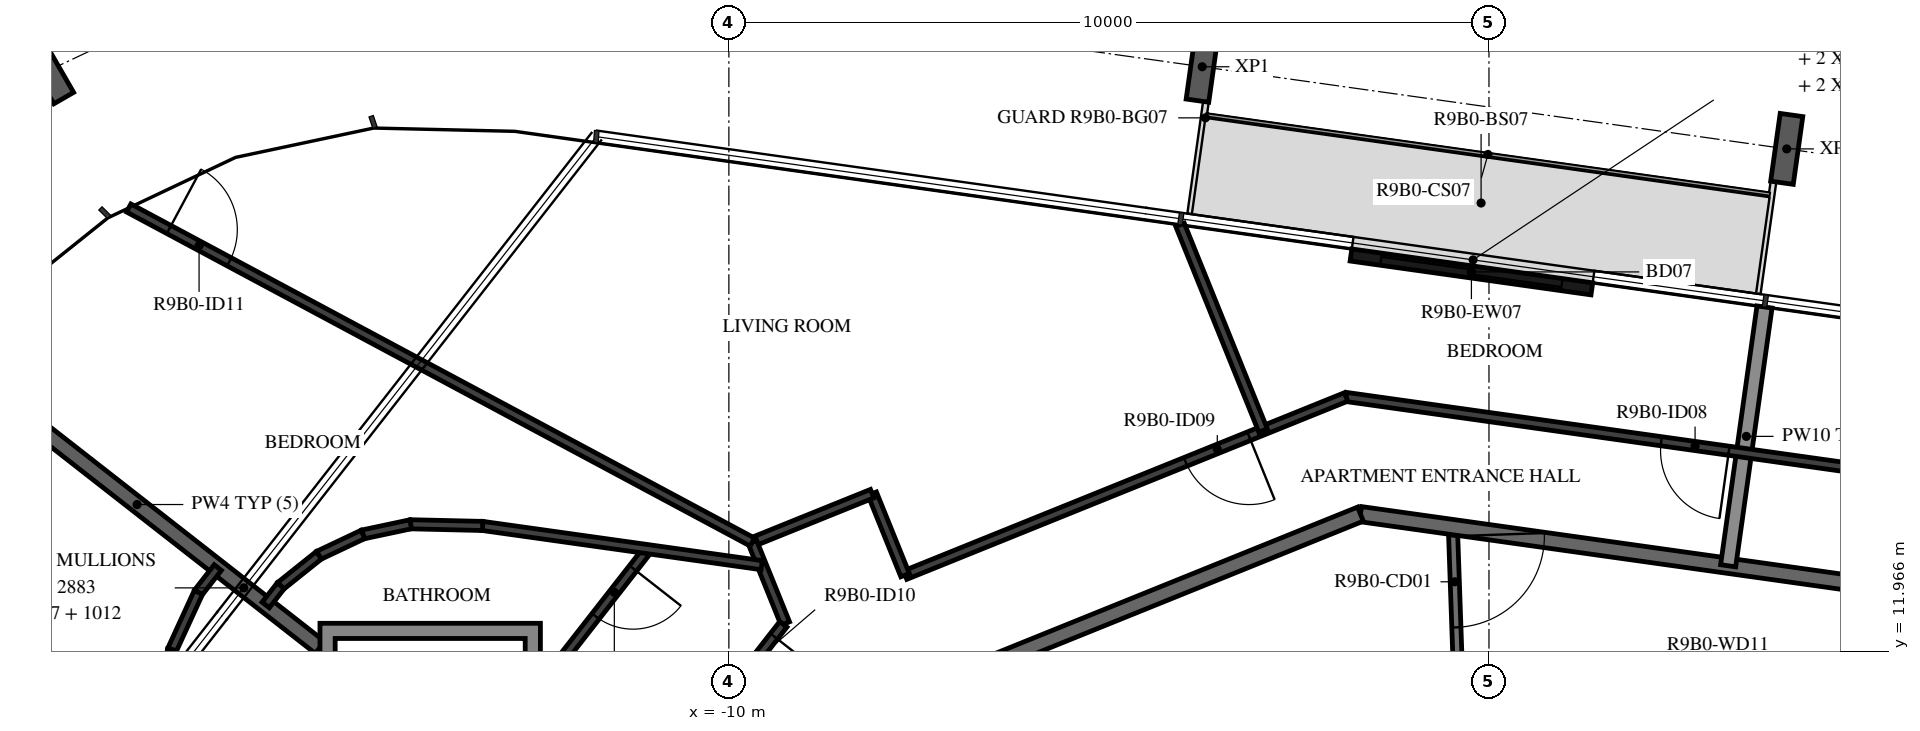
"""IFC4 building model, lengths in metres.
Left out: names, types, materials, properties, quantities, classifications, styles, units other than length and angle.
Written with IfcOpenShell. Run it as: python <this file> out.ifc"""

import sys

from ifc_helpers import new_model, si_unit, direction, frame, frame_2d, origin, origin_2d, place, context, subcontext, project, spatial, polyline, rectangle, i_section, outline, extrude, element, fill, save


model = new_model("IFC4")
c1 = context("Model", 3, precision=1e-05, world=origin(), true_north=direction((0.0, 1.0)))
c2 = subcontext(c1, "Body", "Model", "MODEL_VIEW")
j1 = project(units=[si_unit("LENGTHUNIT", "METRE"), si_unit("PLANEANGLEUNIT", "RADIAN")], contexts=[c1])
p1 = place(None, origin())
s1 = spatial("IfcSite", under=j1, at=p1, CompositionType="ELEMENT")
p2 = place(p1, origin())
s2 = spatial("IfcBuilding", under=s1, at=p2, CompositionType="ELEMENT")
p3 = place(p2, frame((0.0, 0.0, 347.0)))
s3 = spatial("IfcBuildingStorey", under=s2, at=p3, CompositionType="ELEMENT", Elevation=347.0)
for number, where, z_axis, x_axis in (
    (1, (3.917, 18.574, -0.38), (0.0, 0.0, 1.0), (0.99, -0.139, 0.0)),
    (2, (-3.773, 19.655, -0.38), (0.0, 0.0, 1.0), (0.99, -0.139, 0.0)),
    (3, (-18.976, 19.632, -0.38), (0.0, 0.0, 1.0), (0.866, 0.5, 0.0)),
):
    element("IfcColumn", number, at=place(p3, frame(where, z_axis=z_axis, x_axis=x_axis)), inside=s3, PredefinedType="COLUMN", context=c2, shape_type="SweptSolid", body=[
        extrude(i_section(OverallWidth=0.3, OverallDepth=0.9, WebThickness=0.019, FlangeThickness=0.035, FilletRadius=0.03, at=origin_2d()), origin(), (0.0, 0.0, 1.0), 3.5),
    ])
p4 = place(p3, frame((1.354, 16.733, 0.0), z_axis=(0.0, 0.0, 1.0), x_axis=(-0.990270382149, 0.139156639217, 0.0)))
e4 = element("IfcWall", 4, at=p4, inside=s3, PredefinedType="STANDARD", context=c2, shape_type="SweptSolid", body=[
    extrude(rectangle(XDim=3.2, YDim=0.16, at=frame_2d((1.6, 0.0))), origin(), (0.0, 0.0, 1.0), 3.12),
])
p5 = place(p4, frame((0.4, 0.0, 0.0)))
e5 = element("IfcOpeningElement", 5, at=p5, cuts=e4, PredefinedType="OPENING", context=c2, shape_type="SweptSolid", body=[
    extrude(rectangle(XDim=2.4, YDim=2.4, at=frame_2d((1.2, 1.2))), frame((0.0, 0.09, 0.0), z_axis=(0.0, -1.0, 0.0), x_axis=(1.0, 0.0, 0.0)), (0.0, 0.0, 1.0), 0.18),
])
p6 = place(p3, frame((-0.475, 13.598, 0.0), z_axis=(0.0, 0.0, 1.0), x_axis=(0.034852521429, -0.999392466326, 0.0)))
e6 = element("IfcWall", 6, at=p6, inside=s3, PredefinedType="PARTITIONING", context=c2, shape_type="SweptSolid", body=[
    extrude(rectangle(XDim=1.702, YDim=0.12, at=frame_2d((0.851, 0.0))), origin(), (0.0, 0.0, 1.0), 3.12),
])
p7 = place(p6, frame((0.12, 0.0, 0.0)))
e7 = element("IfcOpeningElement", 7, at=p7, cuts=e6, PredefinedType="OPENING", context=c2, shape_type="SweptSolid", body=[
    extrude(rectangle(XDim=1.2, YDim=2.1, at=frame_2d((0.6, 1.05))), frame((0.0, 0.07, 0.0), z_axis=(0.0, -1.0, 0.0), x_axis=(1.0, 0.0, 0.0)), (0.0, 0.0, 1.0), 0.14),
])
p8 = place(p3, frame((5.42, 12.77, 0.0), z_axis=(0.0, 0.0, 1.0), x_axis=(-0.990270565508, 0.139155334385, 0.0)))
e8 = element("IfcWall", 8, at=p8, inside=s3, PredefinedType="STANDARD", context=c2, shape_type="SweptSolid", body=[
    extrude(rectangle(XDim=7.181, YDim=0.2, at=frame_2d((3.59, 0.0))), origin(), (0.0, 0.0, 1.0), 3.12),
])
p9 = place(p3, frame((-1.691, 13.769, 0.0), z_axis=(0.0, 0.0, 1.0), x_axis=(-0.92717916932, -0.374618189599, 0.0)))
e9 = element("IfcWall", 9, at=p9, inside=s3, PredefinedType="STANDARD", context=c2, shape_type="SweptSolid", body=[
    extrude(rectangle(XDim=7.181, YDim=0.2, at=frame_2d((3.591, 0.0))), origin(), (0.0, 0.0, 1.0), 3.12),
])
p10 = place(p3, frame((3.625, 16.494, 0.0), z_axis=(0.0, 0.0, 1.0), x_axis=(-0.139174320859, -0.990267897295, 0.0)))
e10 = element("IfcWall", 10, at=p10, inside=s3, PredefinedType="STANDARD", context=c2, shape_type="SweptSolid", body=[
    extrude(rectangle(XDim=3.438, YDim=0.2, at=frame_2d((1.719, 0.0))), origin(), (0.0, 0.0, 1.0), 2.73),
])
p11 = place(p3, frame((-20.191, 15.775, 0.0), z_axis=(0.0, 0.0, 1.0), x_axis=(0.788021948923, -0.615647145706, 0.0)))
e11 = element("IfcWall", 11, at=p11, inside=s3, PredefinedType="STANDARD", context=c2, shape_type="SweptSolid", body=[
    extrude(rectangle(XDim=6.106, YDim=0.2, at=frame_2d((3.053, 0.0))), origin(), (0.0, 0.0, 1.0), 3.12),
])
p12 = place(p3, frame((6.027, 14.199, 0.0), z_axis=(0.0, 0.0, 1.0), x_axis=(-0.990271593532, 0.139148018469, 0.0)))
e12 = element("IfcWall", 12, at=p12, inside=s3, PredefinedType="PARTITIONING", context=c2, shape_type="SweptSolid", body=[
    extrude(rectangle(XDim=7.985, YDim=0.12, at=frame_2d((3.992, 0.0))), origin(), (0.0, 0.0, 1.0), 3.12),
])
p13 = place(p12, frame((2.898, 0.0, 0.0)))
e13 = element("IfcOpeningElement", 13, at=p13, cuts=e12, PredefinedType="OPENING", context=c2, shape_type="SweptSolid", body=[
    extrude(rectangle(XDim=0.9, YDim=2.1, at=frame_2d((0.45, 1.05))), frame((0.0, 0.07, 0.0), z_axis=(0.0, -1.0, 0.0), x_axis=(1.0, 0.0, 0.0)), (0.0, 0.0, 1.0), 0.14),
])
p14 = place(p3, frame((-1.88, 15.311, 0.0), z_axis=(0.0, 0.0, 1.0), x_axis=(-0.927182163322, -0.374610779365, 0.0)))
e14 = element("IfcWall", 14, at=p14, inside=s3, PredefinedType="PARTITIONING", context=c2, shape_type="SweptSolid", body=[
    extrude(rectangle(XDim=6.257, YDim=0.12, at=frame_2d((3.128, 0.0))), origin(), (0.0, 0.0, 1.0), 3.12),
])
p15 = place(p14, frame((1.377, 0.0, 0.0)))
e15 = element("IfcOpeningElement", 15, at=p15, cuts=e14, PredefinedType="OPENING", context=c2, shape_type="SweptSolid", body=[
    extrude(rectangle(XDim=0.9, YDim=2.1, at=frame_2d((0.45, 1.05))), frame((0.0, 0.07, 0.0), z_axis=(0.0, -1.0, 0.0), x_axis=(1.0, 0.0, 0.0)), (0.0, 0.0, 1.0), 0.14),
])
p16 = place(p3, frame((-7.681, 12.967, 0.0), z_axis=(0.0, 0.0, 1.0), x_axis=(-0.374592224266, 0.927189659951, 0.0)))
e16 = element("IfcWall", 16, at=p16, inside=s3, PredefinedType="PARTITIONING", context=c2, shape_type="SweptSolid", body=[
    extrude(rectangle(XDim=1.156, YDim=0.12, at=frame_2d((0.578, 0.0))), origin(), (0.0, 0.0, 1.0), 3.12),
])
p17 = place(p3, frame((-8.115, 14.039, 0.0), z_axis=(0.0, 0.0, 1.0), x_axis=(-0.927153589835, -0.374681492546, 0.0)))
e17 = element("IfcWall", 17, at=p17, inside=s3, PredefinedType="PARTITIONING", context=c2, shape_type="SweptSolid", body=[
    extrude(rectangle(XDim=1.7, YDim=0.12, at=frame_2d((0.85, 0.0))), origin(), (0.0, 0.0, 1.0), 3.12),
])
p18 = place(p3, frame((-9.691, 13.402, 0.0), z_axis=(0.0, 0.0, 1.0), x_axis=(0.374484003097, -0.927233374844, 0.0)))
e18 = element("IfcWall", 18, at=p18, inside=s3, PredefinedType="PARTITIONING", context=c2, shape_type="SweptSolid", body=[
    extrude(rectangle(XDim=1.156, YDim=0.12, at=frame_2d((0.578, 0.0))), origin(), (0.0, 0.0, 1.0), 3.12),
])
p19 = place(p3, frame((-9.283, 12.319, 0.0), z_axis=(0.0, 0.0, 1.0), x_axis=(-0.61567489546, -0.788000268464, 0.0)))
e19 = element("IfcWall", 19, at=p19, inside=s3, PredefinedType="PARTITIONING", context=c2, shape_type="SweptSolid", body=[
    extrude(rectangle(XDim=7.985, YDim=0.12, at=frame_2d((3.992, 0.0))), origin(), (0.0, 0.0, 1.0), 3.12),
])
p20 = place(p19, frame((0.2, 0.0, 0.0)))
e20 = element("IfcOpeningElement", 20, at=p20, cuts=e19, PredefinedType="OPENING", context=c2, shape_type="SweptSolid", body=[
    extrude(rectangle(XDim=0.9, YDim=2.1, at=frame_2d((0.45, 1.05))), frame((0.0, 0.07, 0.0), z_axis=(0.0, -1.0, 0.0), x_axis=(1.0, 0.0, 0.0)), (0.0, 0.0, 1.0), 0.14),
])
p21 = place(p19, frame((4.592, 0.0, 0.0)))
e21 = element("IfcOpeningElement", 21, at=p21, cuts=e19, PredefinedType="OPENING", context=c2, shape_type="SweptSolid", body=[
    extrude(rectangle(XDim=0.9, YDim=2.1, at=frame_2d((0.45, 1.05))), frame((0.0, 0.07, 0.0), z_axis=(0.0, -1.0, 0.0), x_axis=(1.0, 0.0, 0.0)), (0.0, 0.0, 1.0), 0.14),
])
p22 = place(p3, frame((-4.065, 17.575, 0.0), z_axis=(0.0, 0.0, 1.0), x_axis=(0.374619347258, -0.927178701578, 0.0)))
e22 = element("IfcWall", 22, at=p22, inside=s3, PredefinedType="PARTITIONING", context=c2, shape_type="SweptSolid", body=[
    extrude(rectangle(XDim=2.918, YDim=0.12, at=frame_2d((1.459, 0.0))), origin(), (0.0, 0.0, 1.0), 3.12),
])
p23 = place(p3, frame((-17.896, 17.797, 0.0), z_axis=(0.0, 0.0, 1.0), x_axis=(0.88150492406, -0.4721748287, 0.0)))
e23 = element("IfcWall", 23, at=p23, inside=s3, PredefinedType="PARTITIONING", context=c2, shape_type="SweptSolid", body=[
    extrude(rectangle(XDim=9.308, YDim=0.12, at=frame_2d((4.654, 0.0))), origin(), (0.0, 0.0, 1.0), 3.12),
])
p24 = place(p23, frame((0.6, 0.0, 0.0)))
e24 = element("IfcOpeningElement", 24, at=p24, cuts=e23, PredefinedType="OPENING", context=c2, shape_type="SweptSolid", body=[
    extrude(rectangle(XDim=0.9, YDim=2.1, at=frame_2d((0.45, 1.05))), frame((0.0, 0.07, 0.0), z_axis=(0.0, -1.0, 0.0), x_axis=(1.0, 0.0, 0.0)), (0.0, 0.0, 1.0), 0.14),
])
p25 = place(p3, frame((-11.064, 13.308, 0.0), z_axis=(0.0, 0.0, 1.0), x_axis=(-0.615681126827, -0.787995399777, 0.0)))
e25 = element("IfcWall", 25, at=p25, inside=s3, PredefinedType="PARTITIONING", context=c2, shape_type="SweptSolid", body=[
    extrude(rectangle(XDim=2.3, YDim=0.12, at=frame_2d((1.15, 0.0))), origin(), (0.0, 0.0, 1.0), 3.12),
])
p26 = place(p25, frame((0.32, 0.0, 0.0)))
e26 = element("IfcOpeningElement", 26, at=p26, cuts=e25, PredefinedType="OPENING", context=c2, shape_type="SweptSolid", body=[
    extrude(rectangle(XDim=0.8, YDim=2.1, at=frame_2d((0.4, 1.05))), frame((0.0, 0.07, 0.0), z_axis=(0.0, -1.0, 0.0), x_axis=(1.0, 0.0, 0.0)), (0.0, 0.0, 1.0), 0.14),
])
p27 = place(p3, frame((-9.568, 13.097, 0.0), z_axis=(0.0, 0.0, 1.0), x_axis=(-0.990266931728, 0.13918119099, 0.0)))
e27 = element("IfcWall", 27, at=p27, inside=s3, PredefinedType="PARTITIONING", context=c2, shape_type="SweptSolid", body=[
    extrude(rectangle(XDim=3.708, YDim=0.12, at=frame_2d((1.854, 0.0))), origin(), (0.0, 0.0, 1.0), 3.12),
])
p28 = place(p3, frame((-13.24, 13.614, 0.0), z_axis=(0.0, 0.0, 1.0), x_axis=(-0.999730529074, 0.023213557177, 0.0)))
e28 = element("IfcWall", 28, at=p28, inside=s3, PredefinedType="PARTITIONING", context=c2, shape_type="SweptSolid", body=[
    extrude(rectangle(XDim=0.947, YDim=0.12, at=frame_2d((0.473, 0.0))), origin(), (0.0, 0.0, 1.0), 3.12),
])
p29 = place(p3, frame((-14.186, 13.635, 0.0), z_axis=(0.0, 0.0, 1.0), x_axis=(-0.978217752025, -0.207581380725, 0.0)))
e29 = element("IfcWall", 29, at=p29, inside=s3, PredefinedType="PARTITIONING", context=c2, shape_type="SweptSolid", body=[
    extrude(rectangle(XDim=0.642, YDim=0.12, at=frame_2d((0.321, 0.0))), origin(), (0.0, 0.0, 1.0), 3.12),
])
for number, where, z_axis, x_axis in (
    (30, (-14.814, 13.502, 0.0), (0.0, 0.0, 1.0), (-0.904, -0.428, 0.0)),
    (31, (-15.395, 13.227, 0.0), (0.0, 0.0, 1.0), (-0.781, -0.625, 0.0)),
):
    element("IfcWall", number, at=place(p3, frame(where, z_axis=z_axis, x_axis=x_axis)), inside=s3, PredefinedType="PARTITIONING", context=c2, shape_type="SweptSolid", body=[
        extrude(rectangle(XDim=0.642, YDim=0.12, at=frame_2d((0.321, 0.0))), origin(), (0.0, 0.0, 1.0), 3.12),
    ])
p30 = place(p3, frame((-15.896, 12.826, 0.0), z_axis=(0.0, 0.0, 1.0), x_axis=(-0.615466865985, -0.788162760396, 0.0)))
e32 = element("IfcWall", 32, at=p30, inside=s3, PredefinedType="PARTITIONING", context=c2, shape_type="SweptSolid", body=[
    extrude(rectangle(XDim=0.321, YDim=0.12, at=frame_2d((0.16, 0.0))), origin(), (0.0, 0.0, 1.0), 3.12),
])
p31 = place(p3, frame((-16.724, 13.066, 0.0), z_axis=(0.0, 0.0, 1.0), x_axis=(-0.615895388651, -0.787827944565, 0.0)))
e33 = element("IfcWall", 33, at=p31, inside=s3, PredefinedType="PARTITIONING", context=c2, shape_type="SweptSolid", body=[
    extrude(rectangle(XDim=0.415, YDim=0.12, at=frame_2d((0.207, 0.0))), origin(), (0.0, 0.0, 1.0), 3.12),
])
for number, where, z_axis, x_axis in (
    (34, (-16.979, 12.74, 0.0), (0.0, 0.0, 1.0), (-0.417, -0.909, 0.0)),
    (35, (-17.325, 11.986, 0.0), (0.0, 0.0, 1.0), (-0.197, -0.98, 0.0)),
):
    element("IfcWall", number, at=place(p3, frame(where, z_axis=z_axis, x_axis=x_axis)), inside=s3, PredefinedType="PARTITIONING", context=c2, shape_type="SweptSolid", body=[
        extrude(rectangle(XDim=0.829, YDim=0.12, at=frame_2d((0.415, 0.0))), origin(), (0.0, 0.0, 1.0), 3.12),
    ])
p32 = place(p3, origin())
e36 = element("IfcWall", 36, at=p32, inside=s3, PredefinedType="STANDARD", context=c2, shape_type="SweptSolid", body=[
    extrude(outline(polyline([(-12.479, 12.333), (-12.479, 9.433), (-15.379, 9.433), (-15.379, 12.333), (-12.479, 12.333)]), holes=[polyline([(-15.179, 9.633), (-12.679, 9.633), (-12.679, 12.133), (-15.179, 12.133), (-15.179, 9.633)])]), origin(), (0.0, 0.0, 1.0), 3.12),
])
p33 = place(p5, origin())
e37 = element("IfcDoor", 37, at=p33, inside=s3, OperationType="DOUBLE_DOOR_SLIDING", PredefinedType="DOOR", context=c2, shape_type="SweptSolid", body=[
    extrude(rectangle(XDim=2.4, YDim=2.4, at=frame_2d((1.2, 1.2))), frame((0.0, 0.025, 0.0), z_axis=(0.0, -1.0, 0.0), x_axis=(1.0, 0.0, 0.0)), (0.0, 0.0, 1.0), 0.05),
])
fill(e5, e37)
p34 = place(p13, origin())
e38 = element("IfcDoor", 38, at=p34, inside=s3, OperationType="SINGLE_SWING_LEFT", PredefinedType="DOOR", context=c2, shape_type="SweptSolid", body=[
    extrude(rectangle(XDim=0.9, YDim=2.1, at=frame_2d((0.45, 1.05))), frame((0.0, 0.025, 0.0), z_axis=(0.0, -1.0, 0.0), x_axis=(1.0, 0.0, 0.0)), (0.0, 0.0, 1.0), 0.05),
])
fill(e13, e38)
p35 = place(p15, origin())
e39 = element("IfcDoor", 39, at=p35, inside=s3, OperationType="SINGLE_SWING_RIGHT", PredefinedType="DOOR", context=c2, shape_type="SweptSolid", body=[
    extrude(rectangle(XDim=0.9, YDim=2.1, at=frame_2d((0.45, 1.05))), frame((0.0, 0.025, 0.0), z_axis=(0.0, -1.0, 0.0), x_axis=(1.0, 0.0, 0.0)), (0.0, 0.0, 1.0), 0.05),
])
fill(e15, e39)
p36 = place(p20, origin())
e40 = element("IfcDoor", 40, at=p36, inside=s3, OperationType="SINGLE_SWING_RIGHT", PredefinedType="DOOR", context=c2, shape_type="SweptSolid", body=[
    extrude(rectangle(XDim=0.9, YDim=2.1, at=frame_2d((0.45, 1.05))), frame((0.0, 0.025, 0.0), z_axis=(0.0, -1.0, 0.0), x_axis=(1.0, 0.0, 0.0)), (0.0, 0.0, 1.0), 0.05),
])
fill(e20, e40)
p37 = place(p26, origin())
e41 = element("IfcDoor", 41, at=p37, inside=s3, OperationType="SINGLE_SWING_RIGHT", PredefinedType="DOOR", context=c2, shape_type="SweptSolid", body=[
    extrude(rectangle(XDim=0.8, YDim=2.1, at=frame_2d((0.4, 1.05))), frame((0.0, 0.025, 0.0), z_axis=(0.0, -1.0, 0.0), x_axis=(1.0, 0.0, 0.0)), (0.0, 0.0, 1.0), 0.05),
])
fill(e26, e41)
p38 = place(p24, origin())
e42 = element("IfcDoor", 42, at=p38, inside=s3, OperationType="SINGLE_SWING_RIGHT", PredefinedType="DOOR", context=c2, shape_type="SweptSolid", body=[
    extrude(rectangle(XDim=0.9, YDim=2.1, at=frame_2d((0.45, 1.05))), frame((0.0, 0.025, 0.0), z_axis=(0.0, -1.0, 0.0), x_axis=(1.0, 0.0, 0.0)), (0.0, 0.0, 1.0), 0.05),
])
fill(e24, e42)
p39 = place(p7, origin())
e43 = element("IfcDoor", 43, at=p39, inside=s3, OperationType="DOUBLE_DOOR_SINGLE_SWING", PredefinedType="DOOR", context=c2, shape_type="SweptSolid", body=[
    extrude(rectangle(XDim=1.2, YDim=2.1, at=frame_2d((0.6, 1.05))), frame((0.0, 0.025, 0.0), z_axis=(0.0, -1.0, 0.0), x_axis=(1.0, 0.0, 0.0)), (0.0, 0.0, 1.0), 0.05),
])
fill(e7, e43)
save(model, sys.argv[1])
